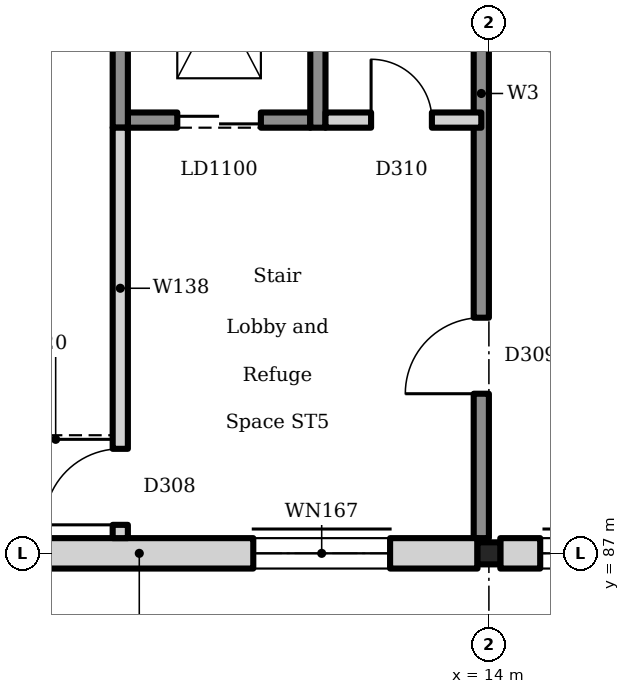
"""IFC4 building model, lengths in metres.
Left out: names, types, materials, properties, quantities, classifications, styles, units other than length and angle.
Written with IfcOpenShell. Run it as: python <this file> out.ifc"""

import sys

from ifc_helpers import new_model, si_unit, direction, frame, frame_2d, origin, origin_2d, place, context, subcontext, project, spatial, rectangle, i_section, extrude, element, fill, save


model = new_model("IFC4")
c1 = context("Model", 3, precision=1e-05, world=origin(), true_north=direction((0.0, 1.0)))
c2 = subcontext(c1, "Body", "Model", "MODEL_VIEW")
j1 = project(units=[si_unit("LENGTHUNIT", "METRE"), si_unit("PLANEANGLEUNIT", "RADIAN")], contexts=[c1])
p1 = place(None, origin())
s1 = spatial("IfcSite", under=j1, at=p1, CompositionType="ELEMENT")
p2 = place(p1, origin())
s2 = spatial("IfcBuilding", under=s1, at=p2, CompositionType="ELEMENT")
p3 = place(p2, frame((0.0, 0.0, 9.9)))
s3 = spatial("IfcBuildingStorey", under=s2, at=p3, CompositionType="ELEMENT", Elevation=9.9)
p4 = place(p3, frame((9.25, 92.7, 0.0), z_axis=(0.0, 0.0, 1.0), x_axis=(1.0, 0.0, 0.0)))
e1 = element("IfcWall", 1, at=p4, inside=s3, PredefinedType="SOLIDWALL", context=c2, shape_type="SweptSolid", body=[
    extrude(rectangle(XDim=2.4, YDim=0.2, at=frame_2d((1.2, 0.0))), origin(), (0.0, 0.0, 1.0), 4.35),
])
p5 = place(p4, frame((0.65, 0.0, 0.0)))
e2 = element("IfcOpeningElement", 2, at=p5, cuts=e1, PredefinedType="OPENING", context=c2, shape_type="SweptSolid", body=[
    extrude(rectangle(XDim=1.1, YDim=2.1, at=frame_2d((0.55, 1.05))), frame((0.0, 0.11, 0.0), z_axis=(0.0, -1.0, 0.0), x_axis=(1.0, 0.0, 0.0)), (0.0, 0.0, 1.0), 0.22),
])
for number, where, z_axis, x_axis in (
    (3, (9.15, 92.6, 0.0), (0.0, 0.0, 1.0), (0.0, 1.0, 0.0)),
    (4, (11.75, 92.6, 0.0), (0.0, 0.0, 1.0), (0.0, 1.0, 0.0)),
):
    element("IfcWall", number, at=place(p3, frame(where, z_axis=z_axis, x_axis=x_axis)), inside=s3, PredefinedType="SOLIDWALL", context=c2, shape_type="SweptSolid", body=[
        extrude(rectangle(XDim=3.4, YDim=0.2, at=frame_2d((1.7, 0.0))), origin(), (0.0, 0.0, 1.0), 4.35),
    ])
p6 = place(p3, frame((14.0, 87.0, 0.0), z_axis=(0.0, 0.0, 1.0), x_axis=(1.0, 0.0, 0.0)))
e5 = element("IfcColumn", 5, at=p6, inside=s3, PredefinedType="COLUMN", context=c2, shape_type="SweptSolid", body=[
    extrude(i_section(OverallWidth=0.3, OverallDepth=0.29, WebThickness=0.009, FlangeThickness=0.014, FilletRadius=0.027, at=origin_2d()), origin(), (0.0, 0.0, 1.0), 4.5),
])
p7 = place(p3, frame((6.15, 87.0, 0.0), z_axis=(0.0, 0.0, 1.0), x_axis=(1.0, 0.0, 0.0)))
e6 = element("IfcWall", 6, at=p7, inside=s3, PredefinedType="SOLIDWALL", context=c2, shape_type="SweptSolid", body=[
    extrude(rectangle(XDim=7.7, YDim=0.4, at=frame_2d((3.85, 0.0))), origin(), (0.0, 0.0, 1.0), 3.93),
])
p8 = place(p7, frame((1.15, 0.0, 1.0)))
e7 = element("IfcOpeningElement", 7, at=p8, cuts=e6, PredefinedType="OPENING", context=c2, shape_type="SweptSolid", body=[
    extrude(rectangle(XDim=0.6, YDim=2.4, at=frame_2d((0.3, 1.2))), frame((0.0, 0.21, 0.0), z_axis=(0.0, -1.0, 0.0), x_axis=(1.0, 0.0, 0.0)), (0.0, 0.0, 1.0), 0.42),
])
p9 = place(p7, frame((4.75, 0.0, 0.45)))
e8 = element("IfcOpeningElement", 8, at=p9, cuts=e6, PredefinedType="OPENING", context=c2, shape_type="SweptSolid", body=[
    extrude(rectangle(XDim=1.8, YDim=3.0, at=frame_2d((0.9, 1.5))), frame((0.0, 0.21, 0.0), z_axis=(0.0, -1.0, 0.0), x_axis=(1.0, 0.0, 0.0)), (0.0, 0.0, 1.0), 0.42),
])
p10 = place(p3, frame((14.15, 87.0, 0.0), z_axis=(0.0, 0.0, 1.0), x_axis=(1.0, 0.0, 0.0)))
e9 = element("IfcWall", 9, at=p10, inside=s3, PredefinedType="SOLIDWALL", context=c2, shape_type="SweptSolid", body=[
    extrude(rectangle(XDim=7.7, YDim=0.4, at=frame_2d((3.85, 0.0))), origin(), (0.0, 0.0, 1.0), 3.93),
])
p11 = place(p10, frame((0.525, 0.0, 0.45)))
e10 = element("IfcOpeningElement", 10, at=p11, cuts=e9, PredefinedType="OPENING", context=c2, shape_type="SweptSolid", body=[
    extrude(rectangle(XDim=1.8, YDim=3.0, at=frame_2d((0.9, 1.5))), frame((0.0, 0.21, 0.0), z_axis=(0.0, -1.0, 0.0), x_axis=(1.0, 0.0, 0.0)), (0.0, 0.0, 1.0), 0.42),
])
p12 = place(p10, frame((2.95, 0.0, 0.45)))
e11 = element("IfcOpeningElement", 11, at=p12, cuts=e9, PredefinedType="OPENING", context=c2, shape_type="SweptSolid", body=[
    extrude(rectangle(XDim=1.8, YDim=3.0, at=frame_2d((0.9, 1.5))), frame((0.0, 0.21, 0.0), z_axis=(0.0, -1.0, 0.0), x_axis=(1.0, 0.0, 0.0)), (0.0, 0.0, 1.0), 0.42),
])
p13 = place(p10, frame((5.325, 0.0, 0.45)))
e12 = element("IfcOpeningElement", 12, at=p13, cuts=e9, PredefinedType="OPENING", context=c2, shape_type="SweptSolid", body=[
    extrude(rectangle(XDim=1.8, YDim=3.0, at=frame_2d((0.9, 1.5))), frame((0.0, 0.21, 0.0), z_axis=(0.0, -1.0, 0.0), x_axis=(1.0, 0.0, 0.0)), (0.0, 0.0, 1.0), 0.42),
])
p14 = place(p3, frame((9.15, 87.2, 0.0), z_axis=(0.0, 0.0, 1.0), x_axis=(0.0, 1.0, 0.0)))
e13 = element("IfcWall", 13, at=p14, inside=s3, PredefinedType="SOLIDWALL", context=c2, shape_type="SweptSolid", body=[
    extrude(rectangle(XDim=5.4, YDim=0.2, at=frame_2d((2.7, 0.0))), origin(), (0.0, 0.0, 1.0), 4.35),
])
p15 = place(p14, frame((0.175, 0.0, 0.0)))
e14 = element("IfcOpeningElement", 14, at=p15, cuts=e13, PredefinedType="OPENING", context=c2, shape_type="SweptSolid", body=[
    extrude(rectangle(XDim=1.0, YDim=2.1, at=frame_2d((0.5, 1.05))), frame((0.0, 0.11, 0.0), z_axis=(0.0, -1.0, 0.0), x_axis=(1.0, 0.0, 0.0)), (0.0, 0.0, 1.0), 0.22),
])
p16 = place(p3, frame((11.85, 92.7, 0.0), z_axis=(0.0, 0.0, 1.0), x_axis=(1.0, 0.0, 0.0)))
e15 = element("IfcWall", 15, at=p16, inside=s3, PredefinedType="SOLIDWALL", context=c2, shape_type="SweptSolid", body=[
    extrude(rectangle(XDim=2.05, YDim=0.2, at=frame_2d((1.025, 0.0))), origin(), (0.0, 0.0, 1.0), 3.91),
])
p17 = place(p16, frame((0.6, 0.0, 0.0)))
e16 = element("IfcOpeningElement", 16, at=p17, cuts=e15, PredefinedType="OPENING", context=c2, shape_type="SweptSolid", body=[
    extrude(rectangle(XDim=0.8, YDim=2.1, at=frame_2d((0.4, 1.05))), frame((0.0, 0.11, 0.0), z_axis=(0.0, -1.0, 0.0), x_axis=(1.0, 0.0, 0.0)), (0.0, 0.0, 1.0), 0.22),
])
p18 = place(p3, frame((13.9, 87.2, 0.0), z_axis=(0.0, 0.0, 1.0), x_axis=(0.0, 1.0, 0.0)))
e17 = element("IfcWall", 17, at=p18, inside=s3, PredefinedType="SOLIDWALL", context=c2, shape_type="SweptSolid", body=[
    extrude(rectangle(XDim=8.8, YDim=0.2, at=frame_2d((4.4, 0.0))), origin(), (0.0, 0.0, 1.0), 3.91),
])
p19 = place(p18, frame((1.9, 0.0, 0.0)))
e18 = element("IfcOpeningElement", 18, at=p19, cuts=e17, PredefinedType="OPENING", context=c2, shape_type="SweptSolid", body=[
    extrude(rectangle(XDim=1.0, YDim=2.1, at=frame_2d((0.5, 1.05))), frame((0.0, 0.11, 0.0), z_axis=(0.0, -1.0, 0.0), x_axis=(1.0, 0.0, 0.0)), (0.0, 0.0, 1.0), 0.22),
])
p20 = place(p5, origin())
e19 = element("IfcDoor", 19, at=p20, inside=s3, OperationType="SLIDING_TO_LEFT", PredefinedType="DOOR", context=c2, shape_type="SweptSolid", body=[
    extrude(rectangle(XDim=1.1, YDim=2.1, at=frame_2d((0.55, 1.05))), frame((0.0, 0.025, 0.0), z_axis=(0.0, -1.0, 0.0), x_axis=(1.0, 0.0, 0.0)), (0.0, 0.0, 1.0), 0.05),
])
fill(e2, e19)
p21 = place(p9, origin())
e20 = element("IfcWindow", 20, at=p21, inside=s3, PartitioningType="SINGLE_PANEL", PredefinedType="WINDOW", context=c2, shape_type="SweptSolid", body=[
    extrude(rectangle(XDim=1.8, YDim=3.0, at=frame_2d((0.9, 1.5))), frame((0.0, 0.03, 0.0), z_axis=(0.0, -1.0, 0.0), x_axis=(1.0, 0.0, 0.0)), (0.0, 0.0, 1.0), 0.06),
])
fill(e8, e20)
p22 = place(p11, origin())
e21 = element("IfcWindow", 21, at=p22, inside=s3, PartitioningType="SINGLE_PANEL", PredefinedType="WINDOW", context=c2, shape_type="SweptSolid", body=[
    extrude(rectangle(XDim=1.8, YDim=3.0, at=frame_2d((0.9, 1.5))), frame((0.0, 0.03, 0.0), z_axis=(0.0, -1.0, 0.0), x_axis=(1.0, 0.0, 0.0)), (0.0, 0.0, 1.0), 0.06),
])
fill(e10, e21)
p23 = place(p15, origin())
e22 = element("IfcDoor", 22, at=p23, inside=s3, OperationType="SINGLE_SWING_RIGHT", PredefinedType="DOOR", context=c2, shape_type="SweptSolid", body=[
    extrude(rectangle(XDim=1.0, YDim=2.1, at=frame_2d((0.5, 1.05))), frame((0.0, 0.025, 0.0), z_axis=(0.0, -1.0, 0.0), x_axis=(1.0, 0.0, 0.0)), (0.0, 0.0, 1.0), 0.05),
])
fill(e14, e22)
p24 = place(p19, origin())
e23 = element("IfcDoor", 23, at=p24, inside=s3, OperationType="SINGLE_SWING_RIGHT", PredefinedType="DOOR", context=c2, shape_type="SweptSolid", body=[
    extrude(rectangle(XDim=1.0, YDim=2.1, at=frame_2d((0.5, 1.05))), frame((0.0, 0.025, 0.0), z_axis=(0.0, -1.0, 0.0), x_axis=(1.0, 0.0, 0.0)), (0.0, 0.0, 1.0), 0.05),
])
fill(e18, e23)
p25 = place(p17, origin())
e24 = element("IfcDoor", 24, at=p25, inside=s3, OperationType="SINGLE_SWING_RIGHT", PredefinedType="DOOR", context=c2, shape_type="SweptSolid", body=[
    extrude(rectangle(XDim=0.8, YDim=2.1, at=frame_2d((0.4, 1.05))), frame((0.0, 0.025, 0.0), z_axis=(0.0, -1.0, 0.0), x_axis=(1.0, 0.0, 0.0)), (0.0, 0.0, 1.0), 0.05),
])
fill(e16, e24)
save(model, sys.argv[1])
